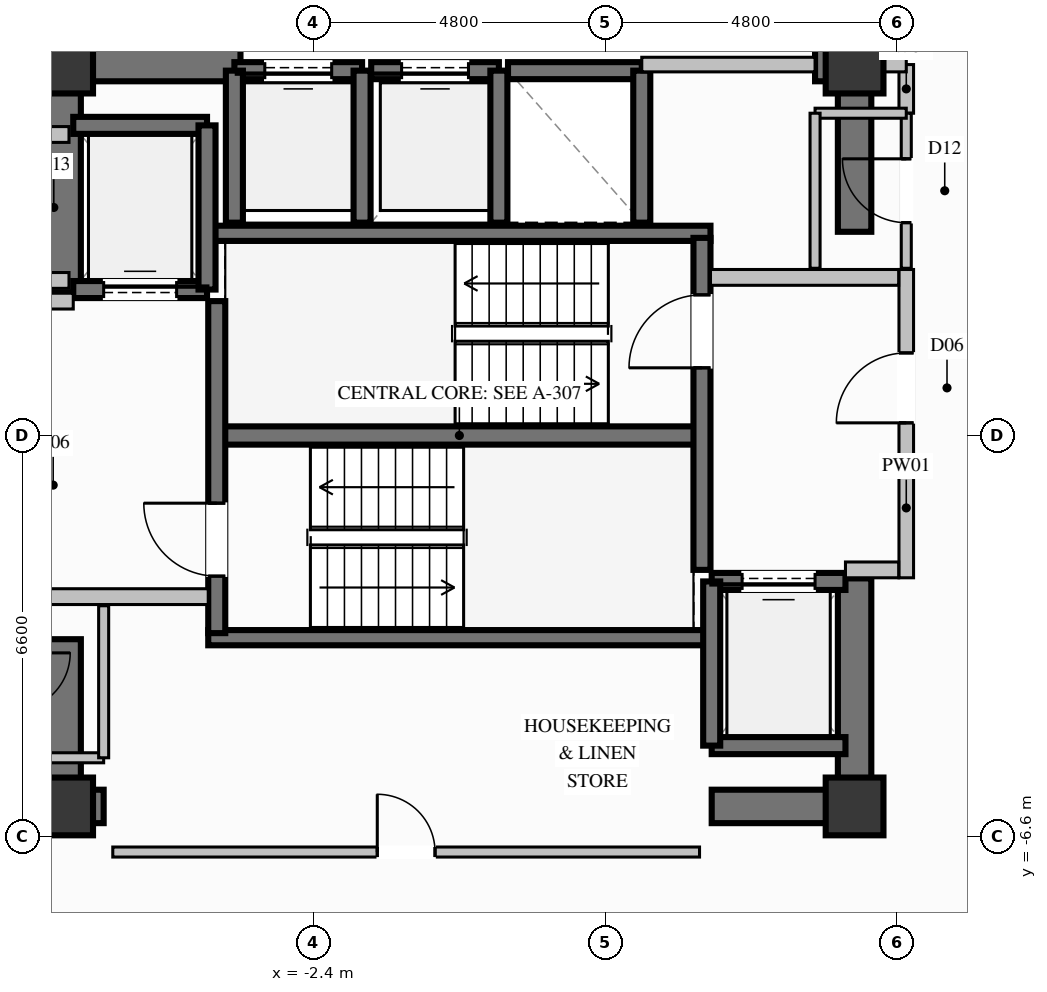
"""IFC4 building model, lengths in metres.
Left out: names, types, materials, properties, quantities, classifications, styles, units other than length and angle.
Written with IfcOpenShell. Run it as: python <this file> out.ifc"""

import sys

from ifc_helpers import new_model, si_unit, direction, frame, frame_2d, origin, origin_2d, place, context, subcontext, project, spatial, rectangle, extrude, element, fill, save


model = new_model("IFC4")
c1 = context("Model", 3, precision=1e-05, world=origin(), true_north=direction((0.0, 1.0)))
c2 = subcontext(c1, "Body", "Model", "MODEL_VIEW")
j1 = project(units=[si_unit("LENGTHUNIT", "METRE"), si_unit("PLANEANGLEUNIT", "RADIAN")], contexts=[c1])
p1 = place(None, origin())
s1 = spatial("IfcSite", under=j1, at=p1, CompositionType="ELEMENT")
p2 = place(p1, origin())
s2 = spatial("IfcBuilding", under=s1, at=p2, CompositionType="ELEMENT")
p3 = place(p2, frame((0.0, 0.0, 176.8)))
s3 = spatial("IfcBuildingStorey", under=s2, at=p3, CompositionType="ELEMENT", Elevation=176.8)
for number, where, z_axis, x_axis in (
    (1, (-6.5, -6.1, 0.0), (0.0, 0.0, 1.0), (1.0, 0.0, 0.0)),
    (2, (6.5, -6.1, 0.0), (0.0, 0.0, 1.0), (1.0, 0.0, 0.0)),
    (3, (6.5, 6.1, 0.0), (0.0, 0.0, 1.0), (1.0, 0.0, 0.0)),
    (4, (-6.5, 6.1, 0.0), (0.0, 0.0, 1.0), (1.0, 0.0, 0.0)),
):
    element("IfcColumn", number, at=place(p3, frame(where, z_axis=z_axis, x_axis=x_axis)), inside=s3, PredefinedType="COLUMN", context=c2, shape_type="SweptSolid", body=[
        extrude(rectangle(XDim=0.95, YDim=0.95, at=origin_2d()), origin(), (0.0, 0.0, 1.0), 3.6),
    ])
p4 = place(p3, frame((-3.99, 0.0, 0.0), z_axis=(0.0, 0.0, 1.0), x_axis=(1.0, 0.0, 0.0)))
e5 = element("IfcWall", 5, at=p4, inside=s3, PredefinedType="SHEAR", context=c2, shape_type="SweptSolid", body=[
    extrude(rectangle(XDim=7.98, YDim=0.3, at=frame_2d((3.99, 0.0))), origin(), (0.0, 0.0, 1.0), 3.6),
])
for number, where, z_axis, x_axis in (
    (6, (-4.13, -3.325, 0.0), (0.0, 0.0, 1.0), (1.0, 0.0, 0.0)),
    (7, (-4.13, 3.325, 0.0), (0.0, 0.0, 1.0), (1.0, 0.0, 0.0)),
):
    element("IfcWall", number, at=place(p3, frame(where, z_axis=z_axis, x_axis=x_axis)), inside=s3, PredefinedType="SOLIDWALL", context=c2, shape_type="SweptSolid", body=[
        extrude(rectangle(XDim=8.26, YDim=0.25, at=frame_2d((4.13, 0.0))), origin(), (0.0, 0.0, 1.0), 3.6),
    ])
p5 = place(p3, frame((-6.225, -6.1, 0.0), z_axis=(0.0, 0.0, 1.0), x_axis=(1.0, 0.0, 0.0)))
e8 = element("IfcWall", 8, at=p5, inside=s3, PredefinedType="SHEAR", context=c2, shape_type="SweptSolid", body=[
    extrude(rectangle(XDim=0.375, YDim=0.55, at=frame_2d((0.188, 0.0))), origin(), (0.0, 0.0, 1.0), 3.6),
])
p6 = place(p3, frame((4.15, -6.1, 0.0), z_axis=(0.0, 0.0, 1.0), x_axis=(1.0, 0.0, 0.0)))
e9 = element("IfcWall", 9, at=p6, inside=s3, PredefinedType="SHEAR", context=c2, shape_type="SweptSolid", body=[
    extrude(rectangle(XDim=2.075, YDim=0.55, at=frame_2d((1.038, 0.0))), origin(), (0.0, 0.0, 1.0), 3.6),
])
p7 = place(p3, frame((-6.225, 6.1, 0.0), z_axis=(0.0, 0.0, 1.0), x_axis=(1.0, 0.0, 0.0)))
e10 = element("IfcWall", 10, at=p7, inside=s3, PredefinedType="SHEAR", context=c2, shape_type="SweptSolid", body=[
    extrude(rectangle(XDim=2.625, YDim=0.55, at=frame_2d((1.312, 0.0))), origin(), (0.0, 0.0, 1.0), 3.6),
])
p8 = place(p3, frame((5.85, 6.1, 0.0), z_axis=(0.0, 0.0, 1.0), x_axis=(1.0, 0.0, 0.0)))
e11 = element("IfcWall", 11, at=p8, inside=s3, PredefinedType="SHEAR", context=c2, shape_type="SweptSolid", body=[
    extrude(rectangle(XDim=0.375, YDim=0.55, at=frame_2d((0.188, 0.0))), origin(), (0.0, 0.0, 1.0), 3.6),
])
p9 = place(p3, frame((-6.5, 2.35, 0.0), z_axis=(0.0, 0.0, 1.0), x_axis=(0.0, 1.0, 0.0)))
e12 = element("IfcWall", 12, at=p9, inside=s3, PredefinedType="SHEAR", context=c2, shape_type="SweptSolid", body=[
    extrude(rectangle(XDim=4.025, YDim=0.55, at=frame_2d((2.012, 0.0))), origin(), (0.0, 0.0, 1.0), 3.6),
])
p10 = place(p3, frame((-6.5, -6.375, 0.0), z_axis=(0.0, 0.0, 1.0), x_axis=(0.0, 1.0, 0.0)))
e13 = element("IfcWall", 13, at=p10, inside=s3, PredefinedType="SHEAR", context=c2, shape_type="SweptSolid", body=[
    extrude(rectangle(XDim=3.025, YDim=0.55, at=frame_2d((1.512, 0.0))), origin(), (0.0, 0.0, 1.0), 3.6),
])
p11 = place(p3, frame((6.5, -6.375, 0.0), z_axis=(0.0, 0.0, 1.0), x_axis=(0.0, 1.0, 0.0)))
e14 = element("IfcWall", 14, at=p11, inside=s3, PredefinedType="SHEAR", context=c2, shape_type="SweptSolid", body=[
    extrude(rectangle(XDim=4.025, YDim=0.55, at=frame_2d((2.012, 0.0))), origin(), (0.0, 0.0, 1.0), 3.6),
])
p12 = place(p3, frame((6.5, 3.35, 0.0), z_axis=(0.0, 0.0, 1.0), x_axis=(0.0, 1.0, 0.0)))
e15 = element("IfcWall", 15, at=p12, inside=s3, PredefinedType="SHEAR", context=c2, shape_type="SweptSolid", body=[
    extrude(rectangle(XDim=3.025, YDim=0.55, at=frame_2d((1.512, 0.0))), origin(), (0.0, 0.0, 1.0), 3.6),
])
p13 = place(p3, frame((-1.6, 6.0, 0.0), z_axis=(0.0, 0.0, 1.0), x_axis=(-1.0, 0.0, 0.0)))
e16 = element("IfcWall", 16, at=p13, inside=s3, PredefinedType="SOLIDWALL", context=c2, shape_type="SweptSolid", body=[
    extrude(rectangle(XDim=2.1, YDim=0.28, at=frame_2d((1.05, 0.0))), origin(), (0.0, 0.0, 1.0), 3.36),
])
p14 = place(p13, frame((0.5, 0.0, 0.0)))
e17 = element("IfcOpeningElement", 17, at=p14, cuts=e16, PredefinedType="OPENING", context=c2, shape_type="SweptSolid", body=[
    extrude(rectangle(XDim=1.1, YDim=2.2, at=frame_2d((0.55, 1.1))), frame((0.0, 0.15, 0.0), z_axis=(0.0, -1.0, 0.0), x_axis=(1.0, 0.0, 0.0)), (0.0, 0.0, 1.0), 0.3),
])
for number, where, z_axis, x_axis in (
    (18, (-3.7, 6.0, 0.0), (0.0, 0.0, 1.0), (0.0, -1.0, 0.0)),
    (19, (-1.6, 3.5, 0.0), (0.0, 0.0, 1.0), (0.0, 1.0, 0.0)),
):
    element("IfcWall", number, at=place(p3, frame(where, z_axis=z_axis, x_axis=x_axis)), inside=s3, PredefinedType="SOLIDWALL", context=c2, shape_type="SweptSolid", body=[
        extrude(rectangle(XDim=2.5, YDim=0.28, at=frame_2d((1.25, 0.0))), origin(), (0.0, 0.0, 1.0), 3.36),
    ])
p15 = place(p3, frame((0.65, 6.0, 0.0), z_axis=(0.0, 0.0, 1.0), x_axis=(-1.0, 0.0, 0.0)))
e20 = element("IfcWall", 20, at=p15, inside=s3, PredefinedType="SOLIDWALL", context=c2, shape_type="SweptSolid", body=[
    extrude(rectangle(XDim=2.1, YDim=0.28, at=frame_2d((1.05, 0.0))), origin(), (0.0, 0.0, 1.0), 3.36),
])
p16 = place(p15, frame((0.5, 0.0, 0.0)))
e21 = element("IfcOpeningElement", 21, at=p16, cuts=e20, PredefinedType="OPENING", context=c2, shape_type="SweptSolid", body=[
    extrude(rectangle(XDim=1.1, YDim=2.2, at=frame_2d((0.55, 1.1))), frame((0.0, 0.15, 0.0), z_axis=(0.0, -1.0, 0.0), x_axis=(1.0, 0.0, 0.0)), (0.0, 0.0, 1.0), 0.3),
])
p17 = place(p3, frame((0.65, 3.5, 0.0), z_axis=(0.0, 0.0, 1.0), x_axis=(0.0, 1.0, 0.0)))
e22 = element("IfcWall", 22, at=p17, inside=s3, PredefinedType="SOLIDWALL", context=c2, shape_type="SweptSolid", body=[
    extrude(rectangle(XDim=2.5, YDim=0.28, at=frame_2d((1.25, 0.0))), origin(), (0.0, 0.0, 1.0), 3.36),
])
p18 = place(p3, frame((3.0, 6.0, 0.0), z_axis=(0.0, 0.0, 1.0), x_axis=(-1.0, 0.0, 0.0)))
e23 = element("IfcWall", 23, at=p18, inside=s3, PredefinedType="SOLIDWALL", context=c2, shape_type="SweptSolid", body=[
    extrude(rectangle(XDim=2.2, YDim=0.28, at=frame_2d((1.1, 0.0))), origin(), (0.0, 0.0, 1.0), 3.36),
])
p19 = place(p3, frame((3.0, 3.5, 0.0), z_axis=(0.0, 0.0, 1.0), x_axis=(0.0, 1.0, 0.0)))
e24 = element("IfcWall", 24, at=p19, inside=s3, PredefinedType="SOLIDWALL", context=c2, shape_type="SweptSolid", body=[
    extrude(rectangle(XDim=2.5, YDim=0.28, at=frame_2d((1.25, 0.0))), origin(), (0.0, 0.0, 1.0), 3.36),
])
p20 = place(p3, frame((-6.35, 2.4, 0.0), z_axis=(0.0, 0.0, 1.0), x_axis=(1.0, 0.0, 0.0)))
e25 = element("IfcWall", 25, at=p20, inside=s3, PredefinedType="SOLIDWALL", context=c2, shape_type="SweptSolid", body=[
    extrude(rectangle(XDim=2.2, YDim=0.28, at=frame_2d((1.1, 0.0))), origin(), (0.0, 0.0, 1.0), 3.36),
])
p21 = place(p20, frame((0.5, 0.0, 0.0)))
e26 = element("IfcOpeningElement", 26, at=p21, cuts=e25, PredefinedType="OPENING", context=c2, shape_type="SweptSolid", body=[
    extrude(rectangle(XDim=1.2, YDim=2.2, at=frame_2d((0.6, 1.1))), frame((0.0, 0.15, 0.0), z_axis=(0.0, -1.0, 0.0), x_axis=(1.0, 0.0, 0.0)), (0.0, 0.0, 1.0), 0.3),
])
p22 = place(p3, frame((-4.15, 5.1, 0.0), z_axis=(0.0, 0.0, 1.0), x_axis=(-1.0, 0.0, 0.0)))
e27 = element("IfcWall", 27, at=p22, inside=s3, PredefinedType="SOLIDWALL", context=c2, shape_type="SweptSolid", body=[
    extrude(rectangle(XDim=2.2, YDim=0.28, at=frame_2d((1.1, 0.0))), origin(), (0.0, 0.0, 1.0), 3.36),
])
p23 = place(p3, frame((-4.15, 2.4, 0.0), z_axis=(0.0, 0.0, 1.0), x_axis=(0.0, 1.0, 0.0)))
e28 = element("IfcWall", 28, at=p23, inside=s3, PredefinedType="SOLIDWALL", context=c2, shape_type="SweptSolid", body=[
    extrude(rectangle(XDim=2.7, YDim=0.28, at=frame_2d((1.35, 0.0))), origin(), (0.0, 0.0, 1.0), 3.36),
])
p24 = place(p3, frame((4.15, -5.1, 0.0), z_axis=(0.0, 0.0, 1.0), x_axis=(1.0, 0.0, 0.0)))
e29 = element("IfcWall", 29, at=p24, inside=s3, PredefinedType="SOLIDWALL", context=c2, shape_type="SweptSolid", body=[
    extrude(rectangle(XDim=2.2, YDim=0.28, at=frame_2d((1.1, 0.0))), origin(), (0.0, 0.0, 1.0), 3.36),
])
p25 = place(p3, frame((6.35, -2.4, 0.0), z_axis=(0.0, 0.0, 1.0), x_axis=(-1.0, 0.0, 0.0)))
e30 = element("IfcWall", 30, at=p25, inside=s3, PredefinedType="SOLIDWALL", context=c2, shape_type="SweptSolid", body=[
    extrude(rectangle(XDim=2.2, YDim=0.28, at=frame_2d((1.1, 0.0))), origin(), (0.0, 0.0, 1.0), 3.36),
])
p26 = place(p25, frame((0.5, 0.0, 0.0)))
e31 = element("IfcOpeningElement", 31, at=p26, cuts=e30, PredefinedType="OPENING", context=c2, shape_type="SweptSolid", body=[
    extrude(rectangle(XDim=1.2, YDim=2.2, at=frame_2d((0.6, 1.1))), frame((0.0, 0.15, 0.0), z_axis=(0.0, -1.0, 0.0), x_axis=(1.0, 0.0, 0.0)), (0.0, 0.0, 1.0), 0.3),
])
p27 = place(p3, frame((4.15, -2.4, 0.0), z_axis=(0.0, 0.0, 1.0), x_axis=(0.0, -1.0, 0.0)))
e32 = element("IfcWall", 32, at=p27, inside=s3, PredefinedType="SOLIDWALL", context=c2, shape_type="SweptSolid", body=[
    extrude(rectangle(XDim=2.7, YDim=0.28, at=frame_2d((1.35, 0.0))), origin(), (0.0, 0.0, 1.0), 3.36),
])
p28 = place(p3, frame((-3.99, -3.25, 0.0), z_axis=(0.0, 0.0, 1.0), x_axis=(0.0, 1.0, 0.0)))
e33 = element("IfcWall", 33, at=p28, inside=s3, PredefinedType="SOLIDWALL", context=c2, shape_type="SweptSolid", body=[
    extrude(rectangle(XDim=5.46, YDim=0.28, at=frame_2d((2.73, 0.0))), origin(), (0.0, 0.0, 1.0), 3.36),
])
p29 = place(p28, frame((0.937, 0.0, 0.0)))
e34 = element("IfcOpeningElement", 34, at=p29, cuts=e33, PredefinedType="OPENING", context=c2, shape_type="SweptSolid", body=[
    extrude(rectangle(XDim=1.2, YDim=2.2, at=frame_2d((0.6, 1.1))), frame((0.0, 0.15, 0.0), z_axis=(0.0, -1.0, 0.0), x_axis=(1.0, 0.0, 0.0)), (0.0, 0.0, 1.0), 0.3),
])
p30 = place(p3, frame((3.99, -2.21, 0.0), z_axis=(0.0, 0.0, 1.0), x_axis=(0.0, 1.0, 0.0)))
e35 = element("IfcWall", 35, at=p30, inside=s3, PredefinedType="SOLIDWALL", context=c2, shape_type="SweptSolid", body=[
    extrude(rectangle(XDim=5.46, YDim=0.28, at=frame_2d((2.73, 0.0))), origin(), (0.0, 0.0, 1.0), 3.36),
])
p31 = place(p30, frame((3.323, 0.0, 0.0)))
e36 = element("IfcOpeningElement", 36, at=p31, cuts=e35, PredefinedType="OPENING", context=c2, shape_type="SweptSolid", body=[
    extrude(rectangle(XDim=1.2, YDim=2.2, at=frame_2d((0.6, 1.1))), frame((0.0, 0.15, 0.0), z_axis=(0.0, -1.0, 0.0), x_axis=(1.0, 0.0, 0.0)), (0.0, 0.0, 1.0), 0.3),
])
p32 = place(p3, frame((-7.225, -2.65, 0.0), z_axis=(0.0, 0.0, 1.0), x_axis=(1.0, 0.0, 0.0)))
e37 = element("IfcWall", 37, at=p32, inside=s3, PredefinedType="PARTITIONING", context=c2, shape_type="SweptSolid", body=[
    extrude(rectangle(XDim=3.095, YDim=0.26, at=frame_2d((1.548, 0.0))), origin(), (0.0, 0.0, 1.0), 3.36),
])
p33 = place(p3, frame((-7.225, 2.21, 0.0), z_axis=(0.0, 0.0, 1.0), x_axis=(1.0, 0.0, 0.0)))
e38 = element("IfcWall", 38, at=p33, inside=s3, PredefinedType="PARTITIONING", context=c2, shape_type="SweptSolid", body=[
    extrude(rectangle(XDim=0.875, YDim=0.26, at=frame_2d((0.438, 0.0))), origin(), (0.0, 0.0, 1.0), 3.36),
])
p34 = place(p3, frame((7.35, -2.34, 0.0), z_axis=(0.0, 0.0, 1.0), x_axis=(0.0, 1.0, 0.0)))
e39 = element("IfcWall", 39, at=p34, inside=s3, PredefinedType="PARTITIONING", context=c2, shape_type="SweptSolid", body=[
    extrude(rectangle(XDim=5.07, YDim=0.24, at=frame_2d((2.535, 0.0))), origin(), (0.0, 0.0, 1.0), 2.445),
])
p35 = place(p34, frame((2.548, 0.0, 0.0)))
e40 = element("IfcOpeningElement", 40, at=p35, cuts=e39, PredefinedType="OPENING", context=c2, shape_type="SweptSolid", body=[
    extrude(rectangle(XDim=1.15, YDim=2.2, at=frame_2d((0.575, 1.1))), frame((0.0, 0.13, 0.0), z_axis=(0.0, -1.0, 0.0), x_axis=(1.0, 0.0, 0.0)), (0.0, 0.0, 1.0), 0.26),
])
p36 = place(p3, frame((6.35, -2.21, 0.0), z_axis=(0.0, 0.0, 1.0), x_axis=(1.0, 0.0, 0.0)))
e41 = element("IfcWall", 41, at=p36, inside=s3, PredefinedType="PARTITIONING", context=c2, shape_type="SweptSolid", body=[
    extrude(rectangle(XDim=0.875, YDim=0.26, at=frame_2d((0.438, 0.0))), origin(), (0.0, 0.0, 1.0), 3.36),
])
p37 = place(p3, frame((4.13, 2.6, 0.0), z_axis=(0.0, 0.0, 1.0), x_axis=(1.0, 0.0, 0.0)))
e42 = element("IfcWall", 42, at=p37, inside=s3, PredefinedType="PARTITIONING", context=c2, shape_type="SweptSolid", body=[
    extrude(rectangle(XDim=3.095, YDim=0.26, at=frame_2d((1.548, 0.0))), origin(), (0.0, 0.0, 1.0), 3.36),
])
for number, where, z_axis, x_axis in (
    (43, (-7.35, 4.95, 0.0), (0.0, 0.0, 1.0), (1.0, 0.0, 0.0)),
    (44, (-7.35, 2.55, 0.0), (0.0, 0.0, 1.0), (1.0, 0.0, 0.0)),
):
    element("IfcWall", number, at=place(p3, frame(where, z_axis=z_axis, x_axis=x_axis)), inside=s3, PredefinedType="PARTITIONING", context=c2, shape_type="SweptSolid", body=[
        extrude(rectangle(XDim=0.93, YDim=0.26, at=frame_2d((0.465, 0.0))), origin(), (0.0, 0.0, 1.0), 3.36),
    ])
p38 = place(p3, frame((3.0, 6.1, 0.0), z_axis=(0.0, 0.0, 1.0), x_axis=(1.0, 0.0, 0.0)))
e45 = element("IfcWall", 45, at=p38, inside=s3, PredefinedType="PARTITIONING", context=c2, shape_type="SweptSolid", body=[
    extrude(rectangle(XDim=2.85, YDim=0.24, at=frame_2d((1.425, 0.0))), origin(), (0.0, 0.0, 1.0), 2.445),
])
p39 = place(p3, frame((7.35, 5.3, 0.0), z_axis=(0.0, 0.0, 1.0), x_axis=(0.0, 1.0, 0.0)))
e46 = element("IfcWall", 46, at=p39, inside=s3, PredefinedType="PARTITIONING", context=c2, shape_type="SweptSolid", body=[
    extrude(rectangle(XDim=0.8, YDim=0.24, at=frame_2d((0.4, 0.0))), origin(), (0.0, 0.0, 1.0), 2.445),
])
for number, where, z_axis, x_axis in (
    (47, (6.5, 6.1, 0.0), (0.0, 0.0, 1.0), (1.0, 0.0, 0.0)),
    (48, (-7.35, 6.1, 0.0), (0.0, 0.0, 1.0), (1.0, 0.0, 0.0)),
):
    element("IfcWall", number, at=place(p3, frame(where, z_axis=z_axis, x_axis=x_axis)), inside=s3, PredefinedType="PARTITIONING", context=c2, shape_type="SweptSolid", body=[
        extrude(rectangle(XDim=0.85, YDim=0.24, at=frame_2d((0.425, 0.0))), origin(), (0.0, 0.0, 1.0), 2.876),
    ])
p40 = place(p3, frame((-7.35, -5.3, 0.0), z_axis=(0.0, 0.0, 1.0), x_axis=(1.0, 0.0, 0.0)))
e49 = element("IfcWall", 49, at=p40, inside=s3, PredefinedType="PARTITIONING", context=c2, shape_type="SweptSolid", body=[
    extrude(rectangle(XDim=1.5, YDim=0.165, at=frame_2d((0.75, 0.0))), origin(), (0.0, 0.0, 1.0), 2.445),
])
p41 = place(p3, frame((-5.85, -5.3, 0.0), z_axis=(0.0, 0.0, 1.0), x_axis=(0.0, 1.0, 0.0)))
e50 = element("IfcWall", 50, at=p41, inside=s3, PredefinedType="PARTITIONING", context=c2, shape_type="SweptSolid", body=[
    extrude(rectangle(XDim=2.5, YDim=0.165, at=frame_2d((1.25, 0.0))), origin(), (0.0, 0.0, 1.0), 2.445),
])
p42 = place(p3, frame((7.35, 2.75, 0.0), z_axis=(0.0, 0.0, 1.0), x_axis=(0.0, 1.0, 0.0)))
e51 = element("IfcWall", 51, at=p42, inside=s3, PredefinedType="PARTITIONING", context=c2, shape_type="SweptSolid", body=[
    extrude(rectangle(XDim=2.55, YDim=0.165, at=frame_2d((1.275, 0.0))), origin(), (0.0, 0.0, 1.0), 3.36),
])
p43 = place(p42, frame((0.75, 0.0, 0.0)))
e52 = element("IfcOpeningElement", 52, at=p43, cuts=e51, PredefinedType="OPENING", context=c2, shape_type="SweptSolid", body=[
    extrude(rectangle(XDim=1.05, YDim=2.15, at=frame_2d((0.525, 1.075))), frame((0.0, 0.093, 0.0), z_axis=(0.0, -1.0, 0.0), x_axis=(1.0, 0.0, 0.0)), (0.0, 0.0, 1.0), 0.185),
])
p44 = place(p3, frame((7.35, 5.3, 0.0), z_axis=(0.0, 0.0, 1.0), x_axis=(-1.0, 0.0, 0.0)))
e53 = element("IfcWall", 53, at=p44, inside=s3, PredefinedType="PARTITIONING", context=c2, shape_type="SweptSolid", body=[
    extrude(rectangle(XDim=1.5, YDim=0.165, at=frame_2d((0.75, 0.0))), origin(), (0.0, 0.0, 1.0), 2.445),
])
p45 = place(p3, frame((5.85, 5.3, 0.0), z_axis=(0.0, 0.0, 1.0), x_axis=(0.0, -1.0, 0.0)))
e54 = element("IfcWall", 54, at=p45, inside=s3, PredefinedType="PARTITIONING", context=c2, shape_type="SweptSolid", body=[
    extrude(rectangle(XDim=2.55, YDim=0.165, at=frame_2d((1.275, 0.0))), origin(), (0.0, 0.0, 1.0), 2.445),
])
p46 = place(p3, frame((-5.7, -6.85, 0.0), z_axis=(0.0, 0.0, 1.0), x_axis=(1.0, 0.0, 0.0)))
e55 = element("IfcWall", 55, at=p46, inside=s3, PredefinedType="PARTITIONING", context=c2, shape_type="SweptSolid", body=[
    extrude(rectangle(XDim=9.65, YDim=0.165, at=frame_2d((4.825, 0.0))), origin(), (0.0, 0.0, 1.0), 2.445),
])
p47 = place(p46, frame((4.35, 0.0, 0.0)))
e56 = element("IfcOpeningElement", 56, at=p47, cuts=e55, PredefinedType="OPENING", context=c2, shape_type="SweptSolid", body=[
    extrude(rectangle(XDim=0.95, YDim=2.1, at=frame_2d((0.475, 1.05))), frame((0.0, 0.093, 0.0), z_axis=(0.0, -1.0, 0.0), x_axis=(1.0, 0.0, 0.0)), (0.0, 0.0, 1.0), 0.185),
])
p48 = place(p3, frame((7.35, 8.65, 0.0), z_axis=(0.0, 0.0, 1.0), x_axis=(0.846409267484, -0.532532958526, 0.0)))
e57 = element("IfcWall", 57, at=p48, inside=s3, PredefinedType="PARTITIONING", context=c2, shape_type="SweptSolid", body=[
    extrude(rectangle(XDim=4.413, YDim=0.24, at=frame_2d((2.206, 0.0))), origin(), (0.0, 0.0, 1.0), 3.36),
])
p49 = place(p48, frame((1.706, 0.0, 0.0)))
e58 = element("IfcOpeningElement", 58, at=p49, cuts=e57, PredefinedType="OPENING", context=c2, shape_type="SweptSolid", body=[
    extrude(rectangle(XDim=1.0, YDim=2.2, at=frame_2d((0.5, 1.1))), frame((0.0, 0.13, 0.0), z_axis=(0.0, -1.0, 0.0), x_axis=(1.0, 0.0, 0.0)), (0.0, 0.0, 1.0), 0.26),
])
p50 = place(p14, origin())
e59 = element("IfcDoor", 59, at=p50, inside=s3, OperationType="SLIDING_TO_LEFT", PredefinedType="DOOR", context=c2, shape_type="SweptSolid", body=[
    extrude(rectangle(XDim=1.1, YDim=2.2, at=frame_2d((0.55, 1.1))), frame((0.0, 0.025, 0.0), z_axis=(0.0, -1.0, 0.0), x_axis=(1.0, 0.0, 0.0)), (0.0, 0.0, 1.0), 0.05),
])
fill(e17, e59)
p51 = place(p16, origin())
e60 = element("IfcDoor", 60, at=p51, inside=s3, OperationType="SLIDING_TO_LEFT", PredefinedType="DOOR", context=c2, shape_type="SweptSolid", body=[
    extrude(rectangle(XDim=1.1, YDim=2.2, at=frame_2d((0.55, 1.1))), frame((0.0, 0.025, 0.0), z_axis=(0.0, -1.0, 0.0), x_axis=(1.0, 0.0, 0.0)), (0.0, 0.0, 1.0), 0.05),
])
fill(e21, e60)
p52 = place(p21, origin())
e61 = element("IfcDoor", 61, at=p52, inside=s3, OperationType="SLIDING_TO_LEFT", PredefinedType="DOOR", context=c2, shape_type="SweptSolid", body=[
    extrude(rectangle(XDim=1.2, YDim=2.2, at=frame_2d((0.6, 1.1))), frame((0.0, 0.025, 0.0), z_axis=(0.0, -1.0, 0.0), x_axis=(1.0, 0.0, 0.0)), (0.0, 0.0, 1.0), 0.05),
])
fill(e26, e61)
p53 = place(p26, origin())
e62 = element("IfcDoor", 62, at=p53, inside=s3, OperationType="SLIDING_TO_LEFT", PredefinedType="DOOR", context=c2, shape_type="SweptSolid", body=[
    extrude(rectangle(XDim=1.2, YDim=2.2, at=frame_2d((0.6, 1.1))), frame((0.0, 0.025, 0.0), z_axis=(0.0, -1.0, 0.0), x_axis=(1.0, 0.0, 0.0)), (0.0, 0.0, 1.0), 0.05),
])
fill(e31, e62)
p54 = place(p29, origin())
e63 = element("IfcDoor", 63, at=p54, inside=s3, OperationType="SINGLE_SWING_RIGHT", PredefinedType="DOOR", context=c2, shape_type="SweptSolid", body=[
    extrude(rectangle(XDim=1.2, YDim=2.2, at=frame_2d((0.6, 1.1))), frame((0.0, 0.025, 0.0), z_axis=(0.0, -1.0, 0.0), x_axis=(1.0, 0.0, 0.0)), (0.0, 0.0, 1.0), 0.05),
])
fill(e34, e63)
p55 = place(p31, origin())
e64 = element("IfcDoor", 64, at=p55, inside=s3, OperationType="SINGLE_SWING_LEFT", PredefinedType="DOOR", context=c2, shape_type="SweptSolid", body=[
    extrude(rectangle(XDim=1.2, YDim=2.2, at=frame_2d((0.6, 1.1))), frame((0.0, 0.025, 0.0), z_axis=(0.0, -1.0, 0.0), x_axis=(1.0, 0.0, 0.0)), (0.0, 0.0, 1.0), 0.05),
])
fill(e36, e64)
p56 = place(p35, origin())
e65 = element("IfcDoor", 65, at=p56, inside=s3, OperationType="SINGLE_SWING_LEFT", PredefinedType="DOOR", context=c2, shape_type="SweptSolid", body=[
    extrude(rectangle(XDim=1.15, YDim=2.2, at=frame_2d((0.575, 1.1))), frame((0.0, 0.025, 0.0), z_axis=(0.0, -1.0, 0.0), x_axis=(1.0, 0.0, 0.0)), (0.0, 0.0, 1.0), 0.05),
])
fill(e40, e65)
p57 = place(p43, origin())
e66 = element("IfcDoor", 66, at=p57, inside=s3, OperationType="SINGLE_SWING_RIGHT", PredefinedType="DOOR", context=c2, shape_type="SweptSolid", body=[
    extrude(rectangle(XDim=1.05, YDim=2.15, at=frame_2d((0.525, 1.075))), frame((0.0, 0.025, 0.0), z_axis=(0.0, -1.0, 0.0), x_axis=(1.0, 0.0, 0.0)), (0.0, 0.0, 1.0), 0.05),
])
fill(e52, e66)
p58 = place(p47, origin())
e67 = element("IfcDoor", 67, at=p58, inside=s3, OperationType="SINGLE_SWING_LEFT", PredefinedType="DOOR", context=c2, shape_type="SweptSolid", body=[
    extrude(rectangle(XDim=0.95, YDim=2.1, at=frame_2d((0.475, 1.05))), frame((0.0, 0.025, 0.0), z_axis=(0.0, -1.0, 0.0), x_axis=(1.0, 0.0, 0.0)), (0.0, 0.0, 1.0), 0.05),
])
fill(e56, e67)
save(model, sys.argv[1])
